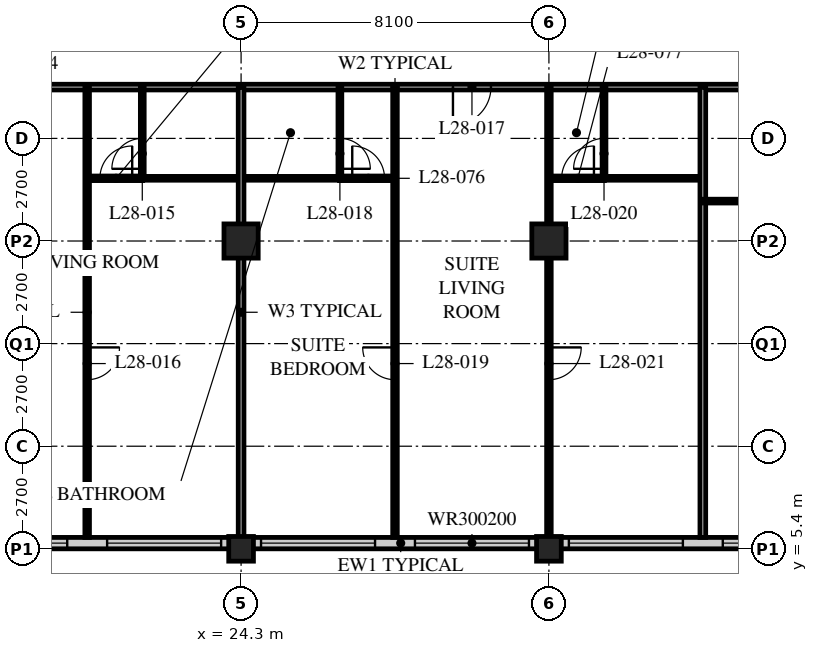
"""IFC4 building model, lengths in metres.
Left out: names, types, materials, properties, quantities, classifications, styles, units other than length and angle.
Written with IfcOpenShell. Run it as: python <this file> out.ifc"""

import sys

from ifc_helpers import new_model, si_unit, direction, frame, frame_2d, origin, origin_2d, place, context, subcontext, project, spatial, rectangle, hollow_rectangle, extrude, element, fill, save


model = new_model("IFC4")
c1 = context("Model", 3, precision=1e-05, world=origin(), true_north=direction((0.0, 1.0)))
c2 = subcontext(c1, "Body", "Model", "MODEL_VIEW")
j1 = project(units=[si_unit("LENGTHUNIT", "METRE"), si_unit("PLANEANGLEUNIT", "RADIAN")], contexts=[c1])
p1 = place(None, origin())
s1 = spatial("IfcSite", under=j1, at=p1, CompositionType="ELEMENT")
p2 = place(p1, origin())
s2 = spatial("IfcBuilding", under=s1, at=p2, CompositionType="ELEMENT")
p3 = place(p2, frame((0.0, 0.0, 113.6)))
s3 = spatial("IfcBuildingStorey", under=s2, at=p3, CompositionType="ELEMENT", Elevation=113.6)
p4 = place(p3, frame((24.3, 5.4, 0.0), z_axis=(0.0, 0.0, 1.0), x_axis=(1.0, 0.0, 0.0)))
e1 = element("IfcColumn", 1, at=p4, inside=s3, PredefinedType="COLUMN", context=c2, shape_type="SweptSolid", body=[
    extrude(hollow_rectangle(XDim=0.65, YDim=0.65, WallThickness=0.055, at=origin_2d()), origin(), (0.0, 0.0, 1.0), 3.4),
])
p5 = place(p3, frame((24.3, 13.5, 0.0), z_axis=(0.0, 0.0, 1.0), x_axis=(1.0, 0.0, 0.0)))
e2 = element("IfcColumn", 2, at=p5, inside=s3, PredefinedType="COLUMN", context=c2, shape_type="SweptSolid", body=[
    extrude(hollow_rectangle(XDim=0.9, YDim=0.9, WallThickness=0.09, at=origin_2d()), origin(), (0.0, 0.0, 1.0), 3.4),
])
p6 = place(p3, frame((32.4, 5.4, 0.0), z_axis=(0.0, 0.0, 1.0), x_axis=(1.0, 0.0, 0.0)))
e3 = element("IfcColumn", 3, at=p6, inside=s3, PredefinedType="COLUMN", context=c2, shape_type="SweptSolid", body=[
    extrude(hollow_rectangle(XDim=0.65, YDim=0.65, WallThickness=0.055, at=origin_2d()), origin(), (0.0, 0.0, 1.0), 3.4),
])
p7 = place(p3, frame((32.4, 13.5, 0.0), z_axis=(0.0, 0.0, 1.0), x_axis=(1.0, 0.0, 0.0)))
e4 = element("IfcColumn", 4, at=p7, inside=s3, PredefinedType="COLUMN", context=c2, shape_type="SweptSolid", body=[
    extrude(hollow_rectangle(XDim=0.9, YDim=0.9, WallThickness=0.09, at=origin_2d()), origin(), (0.0, 0.0, 1.0), 3.4),
])
p8 = place(p3, frame((8.4, 5.55, 0.0), z_axis=(0.0, 0.0, 1.0), x_axis=(1.0, 0.0, 0.0)))
e5 = element("IfcWall", 5, at=p8, inside=s3, PredefinedType="SOLIDWALL", context=c2, shape_type="SweptSolid", body=[
    extrude(rectangle(XDim=40.2, YDim=0.3, at=frame_2d((20.1, 0.0))), origin(), (0.0, 0.0, 1.0), 3.19),
])
p9 = place(p8, frame((0.225, 0.0, 0.9)))
e6 = element("IfcOpeningElement", 6, at=p9, cuts=e5, PredefinedType="OPENING", context=c2, shape_type="SweptSolid", body=[
    extrude(rectangle(XDim=3.0, YDim=2.0, at=frame_2d((1.5, 1.0))), frame((0.0, 0.16, 0.0), z_axis=(0.0, -1.0, 0.0), x_axis=(1.0, 0.0, 0.0)), (0.0, 0.0, 1.0), 0.32),
])
p10 = place(p8, frame((4.275, 0.0, 0.9)))
e7 = element("IfcOpeningElement", 7, at=p10, cuts=e5, PredefinedType="OPENING", context=c2, shape_type="SweptSolid", body=[
    extrude(rectangle(XDim=3.0, YDim=2.0, at=frame_2d((1.5, 1.0))), frame((0.0, 0.16, 0.0), z_axis=(0.0, -1.0, 0.0), x_axis=(1.0, 0.0, 0.0)), (0.0, 0.0, 1.0), 0.32),
])
p11 = place(p8, frame((8.325, 0.0, 0.9)))
e8 = element("IfcOpeningElement", 8, at=p11, cuts=e5, PredefinedType="OPENING", context=c2, shape_type="SweptSolid", body=[
    extrude(rectangle(XDim=3.0, YDim=2.0, at=frame_2d((1.5, 1.0))), frame((0.0, 0.16, 0.0), z_axis=(0.0, -1.0, 0.0), x_axis=(1.0, 0.0, 0.0)), (0.0, 0.0, 1.0), 0.32),
])
p12 = place(p8, frame((12.375, 0.0, 0.9)))
e9 = element("IfcOpeningElement", 9, at=p12, cuts=e5, PredefinedType="OPENING", context=c2, shape_type="SweptSolid", body=[
    extrude(rectangle(XDim=3.0, YDim=2.0, at=frame_2d((1.5, 1.0))), frame((0.0, 0.16, 0.0), z_axis=(0.0, -1.0, 0.0), x_axis=(1.0, 0.0, 0.0)), (0.0, 0.0, 1.0), 0.32),
])
p13 = place(p8, frame((16.425, 0.0, 0.9)))
e10 = element("IfcOpeningElement", 10, at=p13, cuts=e5, PredefinedType="OPENING", context=c2, shape_type="SweptSolid", body=[
    extrude(rectangle(XDim=3.0, YDim=2.0, at=frame_2d((1.5, 1.0))), frame((0.0, 0.16, 0.0), z_axis=(0.0, -1.0, 0.0), x_axis=(1.0, 0.0, 0.0)), (0.0, 0.0, 1.0), 0.32),
])
p14 = place(p8, frame((20.475, 0.0, 0.9)))
e11 = element("IfcOpeningElement", 11, at=p14, cuts=e5, PredefinedType="OPENING", context=c2, shape_type="SweptSolid", body=[
    extrude(rectangle(XDim=3.0, YDim=2.0, at=frame_2d((1.5, 1.0))), frame((0.0, 0.16, 0.0), z_axis=(0.0, -1.0, 0.0), x_axis=(1.0, 0.0, 0.0)), (0.0, 0.0, 1.0), 0.32),
])
p15 = place(p8, frame((24.525, 0.0, 0.9)))
e12 = element("IfcOpeningElement", 12, at=p15, cuts=e5, PredefinedType="OPENING", context=c2, shape_type="SweptSolid", body=[
    extrude(rectangle(XDim=3.0, YDim=2.0, at=frame_2d((1.5, 1.0))), frame((0.0, 0.16, 0.0), z_axis=(0.0, -1.0, 0.0), x_axis=(1.0, 0.0, 0.0)), (0.0, 0.0, 1.0), 0.32),
])
p16 = place(p8, frame((28.575, 0.0, 0.9)))
e13 = element("IfcOpeningElement", 13, at=p16, cuts=e5, PredefinedType="OPENING", context=c2, shape_type="SweptSolid", body=[
    extrude(rectangle(XDim=3.0, YDim=2.0, at=frame_2d((1.5, 1.0))), frame((0.0, 0.16, 0.0), z_axis=(0.0, -1.0, 0.0), x_axis=(1.0, 0.0, 0.0)), (0.0, 0.0, 1.0), 0.32),
])
p17 = place(p8, frame((32.625, 0.0, 0.9)))
e14 = element("IfcOpeningElement", 14, at=p17, cuts=e5, PredefinedType="OPENING", context=c2, shape_type="SweptSolid", body=[
    extrude(rectangle(XDim=3.0, YDim=2.0, at=frame_2d((1.5, 1.0))), frame((0.0, 0.16, 0.0), z_axis=(0.0, -1.0, 0.0), x_axis=(1.0, 0.0, 0.0)), (0.0, 0.0, 1.0), 0.32),
])
p18 = place(p8, frame((36.675, 0.0, 0.9)))
e15 = element("IfcOpeningElement", 15, at=p18, cuts=e5, PredefinedType="OPENING", context=c2, shape_type="SweptSolid", body=[
    extrude(rectangle(XDim=3.0, YDim=2.0, at=frame_2d((1.5, 1.0))), frame((0.0, 0.16, 0.0), z_axis=(0.0, -1.0, 0.0), x_axis=(1.0, 0.0, 0.0)), (0.0, 0.0, 1.0), 0.32),
])
p19 = place(p3, frame((12.15, 17.55, 0.0), z_axis=(0.0, 0.0, 1.0), x_axis=(1.0, 0.0, 0.0)))
e16 = element("IfcWall", 16, at=p19, inside=s3, PredefinedType="PARTITIONING", context=c2, shape_type="SweptSolid", body=[
    extrude(rectangle(XDim=32.4, YDim=0.15, at=frame_2d((16.2, 0.0))), origin(), (0.0, 0.0, 1.0), 3.19),
])
p20 = place(p19, frame((5.95, 0.0, 0.0)))
e17 = element("IfcOpeningElement", 17, at=p20, cuts=e16, PredefinedType="OPENING", context=c2, shape_type="SweptSolid", body=[
    extrude(rectangle(XDim=1.0, YDim=2.1, at=frame_2d((0.5, 1.05))), frame((0.0, 0.085, 0.0), z_axis=(0.0, -1.0, 0.0), x_axis=(1.0, 0.0, 0.0)), (0.0, 0.0, 1.0), 0.17),
])
p21 = place(p19, frame((17.725, 0.0, 0.0)))
e18 = element("IfcOpeningElement", 18, at=p21, cuts=e16, PredefinedType="OPENING", context=c2, shape_type="SweptSolid", body=[
    extrude(rectangle(XDim=1.0, YDim=2.1, at=frame_2d((0.5, 1.05))), frame((0.0, 0.085, 0.0), z_axis=(0.0, -1.0, 0.0), x_axis=(1.0, 0.0, 0.0)), (0.0, 0.0, 1.0), 0.17),
])
p22 = place(p19, frame((26.75, 0.0, 0.0)))
e19 = element("IfcOpeningElement", 19, at=p22, cuts=e16, PredefinedType="OPENING", context=c2, shape_type="SweptSolid", body=[
    extrude(rectangle(XDim=1.0, YDim=2.1, at=frame_2d((0.5, 1.05))), frame((0.0, 0.085, 0.0), z_axis=(0.0, -1.0, 0.0), x_axis=(1.0, 0.0, 0.0)), (0.0, 0.0, 1.0), 0.17),
])
p23 = place(p19, frame((1.525, 0.0, 0.0)))
e20 = element("IfcOpeningElement", 20, at=p23, cuts=e16, PredefinedType="OPENING", context=c2, shape_type="SweptSolid", body=[
    extrude(rectangle(XDim=1.0, YDim=2.1, at=frame_2d((0.5, 1.05))), frame((0.0, 0.085, 0.0), z_axis=(0.0, -1.0, 0.0), x_axis=(1.0, 0.0, 0.0)), (0.0, 0.0, 1.0), 0.17),
])
p24 = place(p19, frame((29.875, 0.0, 0.0)))
e21 = element("IfcOpeningElement", 21, at=p24, cuts=e16, PredefinedType="OPENING", context=c2, shape_type="SweptSolid", body=[
    extrude(rectangle(XDim=1.0, YDim=2.1, at=frame_2d((0.5, 1.05))), frame((0.0, 0.085, 0.0), z_axis=(0.0, -1.0, 0.0), x_axis=(1.0, 0.0, 0.0)), (0.0, 0.0, 1.0), 0.17),
])
p25 = place(p3, frame((21.7, 15.15, 0.0), z_axis=(0.0, 0.0, 1.0), x_axis=(1.0, 0.0, 0.0)))
e22 = element("IfcWall", 22, at=p25, inside=s3, PredefinedType="PARTITIONING", context=c2, shape_type="SweptSolid", body=[
    extrude(rectangle(XDim=5.2, YDim=0.1, at=frame_2d((2.6, 0.0))), origin(), (0.0, 0.0, 1.0), 3.19),
])
p26 = place(p3, frame((21.7, 17.55, 0.0), z_axis=(0.0, 0.0, 1.0), x_axis=(0.0, -1.0, 0.0)))
e23 = element("IfcWall", 23, at=p26, inside=s3, PredefinedType="PARTITIONING", context=c2, shape_type="SweptSolid", body=[
    extrude(rectangle(XDim=2.4, YDim=0.1, at=frame_2d((1.2, 0.0))), origin(), (0.0, 0.0, 1.0), 3.19),
])
p27 = place(p26, frame((1.35, 0.0, 0.0)))
e24 = element("IfcOpeningElement", 24, at=p27, cuts=e23, PredefinedType="OPENING", context=c2, shape_type="SweptSolid", body=[
    extrude(rectangle(XDim=0.8, YDim=2.1, at=frame_2d((0.4, 1.05))), frame((0.0, 0.06, 0.0), z_axis=(0.0, -1.0, 0.0), x_axis=(1.0, 0.0, 0.0)), (0.0, 0.0, 1.0), 0.12),
])
p28 = place(p3, frame((20.25, 17.55, 0.0), z_axis=(0.0, 0.0, 1.0), x_axis=(0.0, -1.0, 0.0)))
e25 = element("IfcWall", 25, at=p28, inside=s3, PredefinedType="PARTITIONING", context=c2, shape_type="SweptSolid", body=[
    extrude(rectangle(XDim=11.85, YDim=0.12, at=frame_2d((5.925, 0.0))), origin(), (0.0, 0.0, 1.0), 3.19),
])
p29 = place(p28, frame((6.85, 0.0, 0.0)))
e26 = element("IfcOpeningElement", 26, at=p29, cuts=e25, PredefinedType="OPENING", context=c2, shape_type="SweptSolid", body=[
    extrude(rectangle(XDim=0.85, YDim=2.1, at=frame_2d((0.425, 1.05))), frame((0.0, 0.07, 0.0), z_axis=(0.0, -1.0, 0.0), x_axis=(1.0, 0.0, 0.0)), (0.0, 0.0, 1.0), 0.14),
])
p30 = place(p3, frame((24.3, 17.55, 0.0), z_axis=(0.0, 0.0, 1.0), x_axis=(0.0, -1.0, 0.0)))
e27 = element("IfcWall", 27, at=p30, inside=s3, PredefinedType="PARTITIONING", context=c2, shape_type="SweptSolid", body=[
    extrude(rectangle(XDim=11.85, YDim=0.15, at=frame_2d((5.925, 0.0))), origin(), (0.0, 0.0, 1.0), 2.578),
])
p31 = place(p3, frame((26.9, 17.55, 0.0), z_axis=(0.0, 0.0, 1.0), x_axis=(0.0, -1.0, 0.0)))
e28 = element("IfcWall", 28, at=p31, inside=s3, PredefinedType="PARTITIONING", context=c2, shape_type="SweptSolid", body=[
    extrude(rectangle(XDim=2.4, YDim=0.1, at=frame_2d((1.2, 0.0))), origin(), (0.0, 0.0, 1.0), 3.19),
])
p32 = place(p31, frame((1.35, 0.0, 0.0)))
e29 = element("IfcOpeningElement", 29, at=p32, cuts=e28, PredefinedType="OPENING", context=c2, shape_type="SweptSolid", body=[
    extrude(rectangle(XDim=0.8, YDim=2.1, at=frame_2d((0.4, 1.05))), frame((0.0, 0.06, 0.0), z_axis=(0.0, -1.0, 0.0), x_axis=(1.0, 0.0, 0.0)), (0.0, 0.0, 1.0), 0.12),
])
p33 = place(p3, frame((28.35, 17.55, 0.0), z_axis=(0.0, 0.0, 1.0), x_axis=(0.0, -1.0, 0.0)))
e30 = element("IfcWall", 30, at=p33, inside=s3, PredefinedType="PARTITIONING", context=c2, shape_type="SweptSolid", body=[
    extrude(rectangle(XDim=11.85, YDim=0.12, at=frame_2d((5.925, 0.0))), origin(), (0.0, 0.0, 1.0), 3.19),
])
p34 = place(p33, frame((6.85, 0.0, 0.0)))
e31 = element("IfcOpeningElement", 31, at=p34, cuts=e30, PredefinedType="OPENING", context=c2, shape_type="SweptSolid", body=[
    extrude(rectangle(XDim=0.85, YDim=2.1, at=frame_2d((0.425, 1.05))), frame((0.0, 0.07, 0.0), z_axis=(0.0, -1.0, 0.0), x_axis=(1.0, 0.0, 0.0)), (0.0, 0.0, 1.0), 0.14),
])
p35 = place(p3, frame((33.85, 15.15, 0.0), z_axis=(0.0, 0.0, 1.0), x_axis=(1.0, 0.0, 0.0)))
e32 = element("IfcWall", 32, at=p35, inside=s3, PredefinedType="PARTITIONING", context=c2, shape_type="SweptSolid", body=[
    extrude(rectangle(XDim=2.6, YDim=0.1, at=frame_2d((1.3, 0.0))), origin(), (0.0, 0.0, 1.0), 3.19),
])
p36 = place(p3, frame((33.85, 17.55, 0.0), z_axis=(0.0, 0.0, 1.0), x_axis=(0.0, -1.0, 0.0)))
e33 = element("IfcWall", 33, at=p36, inside=s3, PredefinedType="PARTITIONING", context=c2, shape_type="SweptSolid", body=[
    extrude(rectangle(XDim=2.4, YDim=0.1, at=frame_2d((1.2, 0.0))), origin(), (0.0, 0.0, 1.0), 3.19),
])
p37 = place(p36, frame((1.35, 0.0, 0.0)))
e34 = element("IfcOpeningElement", 34, at=p37, cuts=e33, PredefinedType="OPENING", context=c2, shape_type="SweptSolid", body=[
    extrude(rectangle(XDim=0.8, YDim=2.1, at=frame_2d((0.4, 1.05))), frame((0.0, 0.06, 0.0), z_axis=(0.0, -1.0, 0.0), x_axis=(1.0, 0.0, 0.0)), (0.0, 0.0, 1.0), 0.12),
])
p38 = place(p3, frame((32.4, 17.55, 0.0), z_axis=(0.0, 0.0, 1.0), x_axis=(0.0, -1.0, 0.0)))
e35 = element("IfcWall", 35, at=p38, inside=s3, PredefinedType="PARTITIONING", context=c2, shape_type="SweptSolid", body=[
    extrude(rectangle(XDim=11.85, YDim=0.12, at=frame_2d((5.925, 0.0))), origin(), (0.0, 0.0, 1.0), 2.578),
])
p39 = place(p38, frame((6.85, 0.0, 0.0)))
e36 = element("IfcOpeningElement", 36, at=p39, cuts=e35, PredefinedType="OPENING", context=c2, shape_type="SweptSolid", body=[
    extrude(rectangle(XDim=0.85, YDim=2.1, at=frame_2d((0.425, 1.05))), frame((0.0, 0.07, 0.0), z_axis=(0.0, -1.0, 0.0), x_axis=(1.0, 0.0, 0.0)), (0.0, 0.0, 1.0), 0.14),
])
p40 = place(p3, frame((36.45, 17.55, 0.0), z_axis=(0.0, 0.0, 1.0), x_axis=(0.0, -1.0, 0.0)))
e37 = element("IfcWall", 37, at=p40, inside=s3, PredefinedType="PARTITIONING", context=c2, shape_type="SweptSolid", body=[
    extrude(rectangle(XDim=11.85, YDim=0.15, at=frame_2d((5.925, 0.0))), origin(), (0.0, 0.0, 1.0), 3.19),
])
p41 = place(p3, frame((36.45, 14.55, 0.0), z_axis=(0.0, 0.0, 1.0), x_axis=(1.0, 0.0, 0.0)))
e38 = element("IfcWall", 38, at=p41, inside=s3, PredefinedType="PARTITIONING", context=c2, shape_type="SweptSolid", body=[
    extrude(rectangle(XDim=2.3, YDim=0.1, at=frame_2d((1.15, 0.0))), origin(), (0.0, 0.0, 1.0), 3.19),
])
p42 = place(p3, frame((21.71, 15.15, 0.0), z_axis=(0.0, 0.0, 1.0), x_axis=(-1.0, 0.0, 0.0)))
e39 = element("IfcWall", 39, at=p42, inside=s3, PredefinedType="PARTITIONING", context=c2, shape_type="SweptSolid", body=[
    extrude(rectangle(XDim=1.46, YDim=0.12, at=frame_2d((0.73, 0.0))), origin(), (0.0, 0.0, 1.0), 3.19),
])
p43 = place(p42, frame((0.275, 0.0, 0.0)))
e40 = element("IfcOpeningElement", 40, at=p43, cuts=e39, PredefinedType="OPENING", context=c2, shape_type="SweptSolid", body=[
    extrude(rectangle(XDim=0.85, YDim=2.1, at=frame_2d((0.425, 1.05))), frame((0.0, 0.07, 0.0), z_axis=(0.0, -1.0, 0.0), x_axis=(1.0, 0.0, 0.0)), (0.0, 0.0, 1.0), 0.14),
])
p44 = place(p3, frame((28.35, 15.15, 0.0), z_axis=(0.0, 0.0, 1.0), x_axis=(-1.0, 0.0, 0.0)))
e41 = element("IfcWall", 41, at=p44, inside=s3, PredefinedType="PARTITIONING", context=c2, shape_type="SweptSolid", body=[
    extrude(rectangle(XDim=1.46, YDim=0.12, at=frame_2d((0.73, 0.0))), origin(), (0.0, 0.0, 1.0), 3.19),
])
p45 = place(p44, frame((0.275, 0.0, 0.0)))
e42 = element("IfcOpeningElement", 42, at=p45, cuts=e41, PredefinedType="OPENING", context=c2, shape_type="SweptSolid", body=[
    extrude(rectangle(XDim=0.85, YDim=2.1, at=frame_2d((0.425, 1.05))), frame((0.0, 0.07, 0.0), z_axis=(0.0, -1.0, 0.0), x_axis=(1.0, 0.0, 0.0)), (0.0, 0.0, 1.0), 0.14),
])
p46 = place(p3, frame((33.86, 15.15, 0.0), z_axis=(0.0, 0.0, 1.0), x_axis=(-1.0, 0.0, 0.0)))
e43 = element("IfcWall", 43, at=p46, inside=s3, PredefinedType="PARTITIONING", context=c2, shape_type="SweptSolid", body=[
    extrude(rectangle(XDim=1.46, YDim=0.12, at=frame_2d((0.73, 0.0))), origin(), (0.0, 0.0, 1.0), 3.19),
])
p47 = place(p46, frame((0.275, 0.0, 0.0)))
e44 = element("IfcOpeningElement", 44, at=p47, cuts=e43, PredefinedType="OPENING", context=c2, shape_type="SweptSolid", body=[
    extrude(rectangle(XDim=0.85, YDim=2.1, at=frame_2d((0.425, 1.05))), frame((0.0, 0.07, 0.0), z_axis=(0.0, -1.0, 0.0), x_axis=(1.0, 0.0, 0.0)), (0.0, 0.0, 1.0), 0.14),
])
p48 = place(p11, origin())
e45 = element("IfcWindow", 45, at=p48, inside=s3, PartitioningType="SINGLE_PANEL", PredefinedType="WINDOW", context=c2, shape_type="SweptSolid", body=[
    extrude(rectangle(XDim=3.0, YDim=2.0, at=frame_2d((1.5, 1.0))), frame((0.0, 0.03, 0.0), z_axis=(0.0, -1.0, 0.0), x_axis=(1.0, 0.0, 0.0)), (0.0, 0.0, 1.0), 0.06),
])
fill(e8, e45)
p49 = place(p12, origin())
e46 = element("IfcWindow", 46, at=p49, inside=s3, PartitioningType="SINGLE_PANEL", PredefinedType="WINDOW", context=c2, shape_type="SweptSolid", body=[
    extrude(rectangle(XDim=3.0, YDim=2.0, at=frame_2d((1.5, 1.0))), frame((0.0, 0.03, 0.0), z_axis=(0.0, -1.0, 0.0), x_axis=(1.0, 0.0, 0.0)), (0.0, 0.0, 1.0), 0.06),
])
fill(e9, e46)
p50 = place(p13, origin())
e47 = element("IfcWindow", 47, at=p50, inside=s3, PartitioningType="SINGLE_PANEL", PredefinedType="WINDOW", context=c2, shape_type="SweptSolid", body=[
    extrude(rectangle(XDim=3.0, YDim=2.0, at=frame_2d((1.5, 1.0))), frame((0.0, 0.03, 0.0), z_axis=(0.0, -1.0, 0.0), x_axis=(1.0, 0.0, 0.0)), (0.0, 0.0, 1.0), 0.06),
])
fill(e10, e47)
p51 = place(p14, origin())
e48 = element("IfcWindow", 48, at=p51, inside=s3, PartitioningType="SINGLE_PANEL", PredefinedType="WINDOW", context=c2, shape_type="SweptSolid", body=[
    extrude(rectangle(XDim=3.0, YDim=2.0, at=frame_2d((1.5, 1.0))), frame((0.0, 0.03, 0.0), z_axis=(0.0, -1.0, 0.0), x_axis=(1.0, 0.0, 0.0)), (0.0, 0.0, 1.0), 0.06),
])
fill(e11, e48)
p52 = place(p15, origin())
e49 = element("IfcWindow", 49, at=p52, inside=s3, PartitioningType="SINGLE_PANEL", PredefinedType="WINDOW", context=c2, shape_type="SweptSolid", body=[
    extrude(rectangle(XDim=3.0, YDim=2.0, at=frame_2d((1.5, 1.0))), frame((0.0, 0.03, 0.0), z_axis=(0.0, -1.0, 0.0), x_axis=(1.0, 0.0, 0.0)), (0.0, 0.0, 1.0), 0.06),
])
fill(e12, e49)
p53 = place(p16, origin())
e50 = element("IfcWindow", 50, at=p53, inside=s3, PartitioningType="SINGLE_PANEL", PredefinedType="WINDOW", context=c2, shape_type="SweptSolid", body=[
    extrude(rectangle(XDim=3.0, YDim=2.0, at=frame_2d((1.5, 1.0))), frame((0.0, 0.03, 0.0), z_axis=(0.0, -1.0, 0.0), x_axis=(1.0, 0.0, 0.0)), (0.0, 0.0, 1.0), 0.06),
])
fill(e13, e50)
p54 = place(p27, origin())
e51 = element("IfcDoor", 51, at=p54, inside=s3, OperationType="SINGLE_SWING_LEFT", PredefinedType="DOOR", context=c2, shape_type="SweptSolid", body=[
    extrude(rectangle(XDim=0.8, YDim=2.1, at=frame_2d((0.4, 1.05))), frame((0.0, 0.025, 0.0), z_axis=(0.0, -1.0, 0.0), x_axis=(1.0, 0.0, 0.0)), (0.0, 0.0, 1.0), 0.05),
])
fill(e24, e51)
p55 = place(p29, origin())
e52 = element("IfcDoor", 52, at=p55, inside=s3, OperationType="SINGLE_SWING_LEFT", PredefinedType="DOOR", context=c2, shape_type="SweptSolid", body=[
    extrude(rectangle(XDim=0.85, YDim=2.1, at=frame_2d((0.425, 1.05))), frame((0.0, 0.025, 0.0), z_axis=(0.0, -1.0, 0.0), x_axis=(1.0, 0.0, 0.0)), (0.0, 0.0, 1.0), 0.05),
])
fill(e26, e52)
p56 = place(p21, origin())
e53 = element("IfcDoor", 53, at=p56, inside=s3, OperationType="SINGLE_SWING_RIGHT", PredefinedType="DOOR", context=c2, shape_type="SweptSolid", body=[
    extrude(rectangle(XDim=1.0, YDim=2.1, at=frame_2d((0.5, 1.05))), frame((0.0, 0.025, 0.0), z_axis=(0.0, -1.0, 0.0), x_axis=(1.0, 0.0, 0.0)), (0.0, 0.0, 1.0), 0.05),
])
fill(e18, e53)
p57 = place(p32, origin())
e54 = element("IfcDoor", 54, at=p57, inside=s3, OperationType="SINGLE_SWING_RIGHT", PredefinedType="DOOR", context=c2, shape_type="SweptSolid", body=[
    extrude(rectangle(XDim=0.8, YDim=2.1, at=frame_2d((0.4, 1.05))), frame((0.0, 0.025, 0.0), z_axis=(0.0, -1.0, 0.0), x_axis=(1.0, 0.0, 0.0)), (0.0, 0.0, 1.0), 0.05),
])
fill(e29, e54)
p58 = place(p34, origin())
e55 = element("IfcDoor", 55, at=p58, inside=s3, OperationType="SINGLE_SWING_RIGHT", PredefinedType="DOOR", context=c2, shape_type="SweptSolid", body=[
    extrude(rectangle(XDim=0.85, YDim=2.1, at=frame_2d((0.425, 1.05))), frame((0.0, 0.025, 0.0), z_axis=(0.0, -1.0, 0.0), x_axis=(1.0, 0.0, 0.0)), (0.0, 0.0, 1.0), 0.05),
])
fill(e31, e55)
p59 = place(p37, origin())
e56 = element("IfcDoor", 56, at=p59, inside=s3, OperationType="SINGLE_SWING_LEFT", PredefinedType="DOOR", context=c2, shape_type="SweptSolid", body=[
    extrude(rectangle(XDim=0.8, YDim=2.1, at=frame_2d((0.4, 1.05))), frame((0.0, 0.025, 0.0), z_axis=(0.0, -1.0, 0.0), x_axis=(1.0, 0.0, 0.0)), (0.0, 0.0, 1.0), 0.05),
])
fill(e34, e56)
p60 = place(p39, origin())
e57 = element("IfcDoor", 57, at=p60, inside=s3, OperationType="SINGLE_SWING_LEFT", PredefinedType="DOOR", context=c2, shape_type="SweptSolid", body=[
    extrude(rectangle(XDim=0.85, YDim=2.1, at=frame_2d((0.425, 1.05))), frame((0.0, 0.025, 0.0), z_axis=(0.0, -1.0, 0.0), x_axis=(1.0, 0.0, 0.0)), (0.0, 0.0, 1.0), 0.05),
])
fill(e36, e57)
p61 = place(p43, origin())
e58 = element("IfcDoor", 58, at=p61, inside=s3, OperationType="SINGLE_SWING_RIGHT", PredefinedType="DOOR", context=c2, shape_type="SweptSolid", body=[
    extrude(rectangle(XDim=0.85, YDim=2.1, at=frame_2d((0.425, 1.05))), frame((0.0, 0.025, 0.0), z_axis=(0.0, -1.0, 0.0), x_axis=(1.0, 0.0, 0.0)), (0.0, 0.0, 1.0), 0.05),
])
fill(e40, e58)
p62 = place(p45, origin())
e59 = element("IfcDoor", 59, at=p62, inside=s3, OperationType="SINGLE_SWING_LEFT", PredefinedType="DOOR", context=c2, shape_type="SweptSolid", body=[
    extrude(rectangle(XDim=0.85, YDim=2.1, at=frame_2d((0.425, 1.05))), frame((0.0, 0.025, 0.0), z_axis=(0.0, -1.0, 0.0), x_axis=(1.0, 0.0, 0.0)), (0.0, 0.0, 1.0), 0.05),
])
fill(e42, e59)
p63 = place(p47, origin())
e60 = element("IfcDoor", 60, at=p63, inside=s3, OperationType="SINGLE_SWING_RIGHT", PredefinedType="DOOR", context=c2, shape_type="SweptSolid", body=[
    extrude(rectangle(XDim=0.85, YDim=2.1, at=frame_2d((0.425, 1.05))), frame((0.0, 0.025, 0.0), z_axis=(0.0, -1.0, 0.0), x_axis=(1.0, 0.0, 0.0)), (0.0, 0.0, 1.0), 0.05),
])
fill(e44, e60)
save(model, sys.argv[1])
